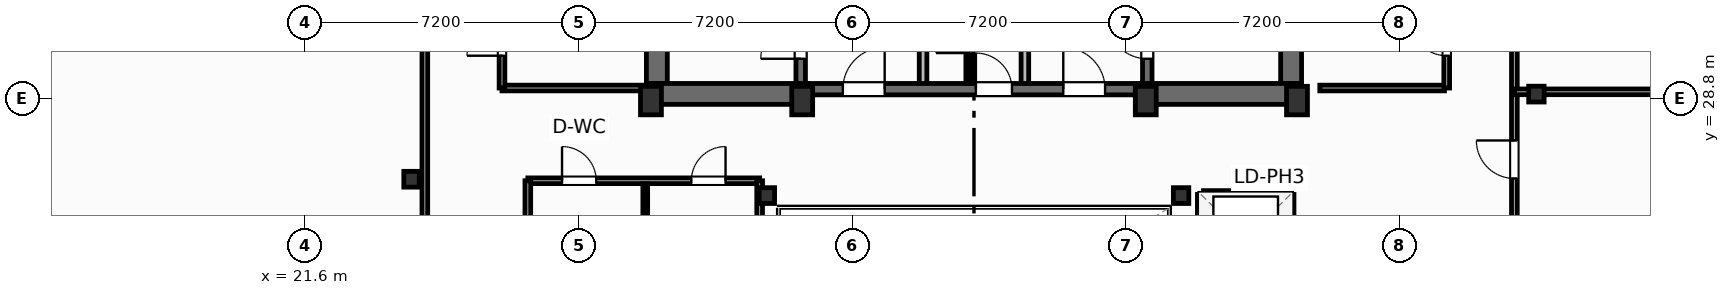
"""IFC4 building model, lengths in metres.
Left out: names, types, materials, properties, quantities, classifications, styles, units other than length and angle.
Written with IfcOpenShell. Run it as: python <this file> out.ifc"""

import sys

from ifc_helpers import new_model, si_unit, direction, frame, frame_2d, origin, origin_2d, place, context, subcontext, project, spatial, rectangle, i_section, extrude, element, fill, save


model = new_model("IFC4")
c1 = context("Model", 3, precision=1e-05, world=origin(), true_north=direction((0.0, 1.0)))
c2 = subcontext(c1, "Body", "Model", "MODEL_VIEW")
j1 = project(units=[si_unit("LENGTHUNIT", "METRE"), si_unit("PLANEANGLEUNIT", "RADIAN")], contexts=[c1])
p1 = place(None, origin())
s1 = spatial("IfcSite", under=j1, at=p1, CompositionType="ELEMENT")
p2 = place(p1, origin())
s2 = spatial("IfcBuilding", under=s1, at=p2, CompositionType="ELEMENT")
p3 = place(p2, frame((0.0, 0.0, 284.1)))
s3 = spatial("IfcBuildingStorey", under=s2, at=p3, CompositionType="ELEMENT", Elevation=284.1)
for number, where, z_axis, x_axis in (
    (1, (30.7, 28.75, 0.0), (0.0, 0.0, 1.0), (1.0, 0.0, 0.0)),
    (2, (34.68, 28.75, 0.0), (0.0, 0.0, 1.0), (1.0, 0.0, 0.0)),
    (3, (43.72, 28.75, 0.0), (0.0, 0.0, 1.0), (1.0, 0.0, 0.0)),
    (4, (47.7, 28.75, 0.0), (0.0, 0.0, 1.0), (1.0, 0.0, 0.0)),
):
    element("IfcColumn", number, at=place(p3, frame(where, z_axis=z_axis, x_axis=x_axis)), inside=s3, PredefinedType="COLUMN", context=c2, shape_type="SweptSolid", body=[
        extrude(rectangle(XDim=0.55, YDim=0.75, at=origin_2d()), origin(), (0.0, 0.0, 1.0), 3.7),
    ])
for number, where, z_axis, x_axis in (
    (5, (33.75, 26.25, 0.0), (0.0, 0.0, 1.0), (1.0, 0.0, 0.0)),
    (6, (44.65, 26.25, 0.0), (0.0, 0.0, 1.0), (1.0, 0.0, 0.0)),
    (7, (24.4, 26.68, 0.0), (0.0, 0.0, 1.0), (1.0, 0.0, 0.0)),
    (8, (54.0, 28.92, 0.0), (0.0, 0.0, 1.0), (1.0, 0.0, 0.0)),
):
    element("IfcColumn", number, at=place(p3, frame(where, z_axis=z_axis, x_axis=x_axis)), inside=s3, PredefinedType="COLUMN", context=c2, shape_type="SweptSolid", body=[
        extrude(i_section(OverallWidth=0.406, OverallDepth=0.416, WebThickness=0.03, FlangeThickness=0.048, FilletRadius=0.025, at=origin_2d()), origin(), (0.0, 0.0, 1.0), 3.7),
    ])
for number, where, z_axis, x_axis in (
    (9, (30.855, 29.2, 0.0), (0.0, 0.0, 1.0), (0.0, 1.0, 0.0)),
    (10, (47.545, 29.2, 0.0), (0.0, 0.0, 1.0), (0.0, 1.0, 0.0)),
):
    element("IfcWall", number, at=place(p3, frame(where, z_axis=z_axis, x_axis=x_axis)), inside=s3, PredefinedType="SHEAR", context=c2, shape_type="SweptSolid", body=[
        extrude(rectangle(XDim=9.22, YDim=0.55, at=frame_2d((4.61, 0.0))), origin(), (0.0, 0.0, 1.0), 3.45),
    ])
for number, where, z_axis, x_axis in (
    (11, (30.58, 28.925, 0.0), (0.0, 0.0, 1.0), (1.0, 0.0, 0.0)),
    (12, (43.6, 28.925, 0.0), (0.0, 0.0, 1.0), (1.0, 0.0, 0.0)),
):
    element("IfcWall", number, at=place(p3, frame(where, z_axis=z_axis, x_axis=x_axis)), inside=s3, PredefinedType="SHEAR", context=c2, shape_type="SweptSolid", body=[
        extrude(rectangle(XDim=4.22, YDim=0.55, at=frame_2d((2.11, 0.0))), origin(), (0.0, 0.0, 1.0), 3.45),
    ])
p4 = place(p3, frame((34.8, 29.05, 0.0), z_axis=(0.0, 0.0, 1.0), x_axis=(1.0, 0.0, 0.0)))
e13 = element("IfcWall", 13, at=p4, inside=s3, PredefinedType="SHEAR", context=c2, shape_type="SweptSolid", body=[
    extrude(rectangle(XDim=8.8, YDim=0.3, at=frame_2d((4.4, 0.0))), origin(), (0.0, 0.0, 1.0), 3.45),
])
p5 = place(p4, frame((0.95, 0.0, 0.0)))
e14 = element("IfcOpeningElement", 14, at=p5, cuts=e13, PredefinedType="OPENING", context=c2, shape_type="SweptSolid", body=[
    extrude(rectangle(XDim=1.1, YDim=2.15, at=frame_2d((0.55, 1.075))), frame((0.0, 0.16, 0.0), z_axis=(0.0, -1.0, 0.0), x_axis=(1.0, 0.0, 0.0)), (0.0, 0.0, 1.0), 0.32),
])
p6 = place(p4, frame((6.75, 0.0, 0.0)))
e15 = element("IfcOpeningElement", 15, at=p6, cuts=e13, PredefinedType="OPENING", context=c2, shape_type="SweptSolid", body=[
    extrude(rectangle(XDim=1.1, YDim=2.15, at=frame_2d((0.55, 1.075))), frame((0.0, 0.16, 0.0), z_axis=(0.0, -1.0, 0.0), x_axis=(1.0, 0.0, 0.0)), (0.0, 0.0, 1.0), 0.32),
])
p7 = place(p4, frame((4.45, 0.0, 0.0)))
e16 = element("IfcOpeningElement", 16, at=p7, cuts=e13, PredefinedType="OPENING", context=c2, shape_type="SweptSolid", body=[
    extrude(rectangle(XDim=0.95, YDim=2.15, at=frame_2d((0.475, 1.075))), frame((0.0, 0.16, 0.0), z_axis=(0.0, -1.0, 0.0), x_axis=(1.0, 0.0, 0.0)), (0.0, 0.0, 1.0), 0.32),
])
p8 = place(p3, frame((34.64, 29.2, 0.0), z_axis=(0.0, 0.0, 1.0), x_axis=(0.0, 1.0, 0.0)))
e17 = element("IfcWall", 17, at=p8, inside=s3, PredefinedType="SHEAR", context=c2, shape_type="SweptSolid", body=[
    extrude(rectangle(XDim=9.22, YDim=0.25, at=frame_2d((4.61, 0.0))), origin(), (0.0, 0.0, 1.0), 3.45),
])
p9 = place(p8, frame((0.65, 0.0, 0.0)))
e18 = element("IfcOpeningElement", 18, at=p9, cuts=e17, PredefinedType="OPENING", context=c2, shape_type="SweptSolid", body=[
    extrude(rectangle(XDim=1.05, YDim=2.15, at=frame_2d((0.525, 1.075))), frame((0.0, 0.135, 0.0), z_axis=(0.0, -1.0, 0.0), x_axis=(1.0, 0.0, 0.0)), (0.0, 0.0, 1.0), 0.27),
])
p10 = place(p3, frame((43.76, 29.2, 0.0), z_axis=(0.0, 0.0, 1.0), x_axis=(0.0, 1.0, 0.0)))
e19 = element("IfcWall", 19, at=p10, inside=s3, PredefinedType="SHEAR", context=c2, shape_type="SweptSolid", body=[
    extrude(rectangle(XDim=9.22, YDim=0.25, at=frame_2d((4.61, 0.0))), origin(), (0.0, 0.0, 1.0), 3.45),
])
p11 = place(p10, frame((0.65, 0.0, 0.0)))
e20 = element("IfcOpeningElement", 20, at=p11, cuts=e19, PredefinedType="OPENING", context=c2, shape_type="SweptSolid", body=[
    extrude(rectangle(XDim=1.05, YDim=2.15, at=frame_2d((0.525, 1.075))), frame((0.0, 0.135, 0.0), z_axis=(0.0, -1.0, 0.0), x_axis=(1.0, 0.0, 0.0)), (0.0, 0.0, 1.0), 0.27),
])
p12 = place(p3, frame((27.46, 26.64, 0.0), z_axis=(0.0, 0.0, 1.0), x_axis=(1.0, 0.0, 0.0)))
e21 = element("IfcWall", 21, at=p12, inside=s3, PredefinedType="PARTITIONING", context=c2, shape_type="SweptSolid", body=[
    extrude(rectangle(XDim=6.1, YDim=0.15, at=frame_2d((3.05, 0.0))), origin(), (0.0, 0.0, 1.0), 2.662),
])
p13 = place(p12, frame((0.9, 0.0, 0.0)))
e22 = element("IfcOpeningElement", 22, at=p13, cuts=e21, PredefinedType="OPENING", context=c2, shape_type="SweptSolid", body=[
    extrude(rectangle(XDim=0.9, YDim=2.05, at=frame_2d((0.45, 1.025))), frame((0.0, 0.085, 0.0), z_axis=(0.0, -1.0, 0.0), x_axis=(1.0, 0.0, 0.0)), (0.0, 0.0, 1.0), 0.17),
])
p14 = place(p12, frame((4.303, 0.0, 0.0)))
e23 = element("IfcOpeningElement", 23, at=p14, cuts=e21, PredefinedType="OPENING", context=c2, shape_type="SweptSolid", body=[
    extrude(rectangle(XDim=0.9, YDim=2.05, at=frame_2d((0.45, 1.025))), frame((0.0, 0.085, 0.0), z_axis=(0.0, -1.0, 0.0), x_axis=(1.0, 0.0, 0.0)), (0.0, 0.0, 1.0), 0.17),
])
p15 = place(p3, frame((30.55, 19.38, 0.0), z_axis=(0.0, 0.0, 1.0), x_axis=(0.0, 1.0, 0.0)))
e24 = element("IfcWall", 24, at=p15, inside=s3, PredefinedType="PARTITIONING", context=c2, shape_type="SweptSolid", body=[
    extrude(rectangle(XDim=7.18, YDim=0.125, at=frame_2d((3.59, 0.0))), origin(), (0.0, 0.0, 1.0), 3.45),
])
p16 = place(p3, frame((27.46, 19.3, 0.0), z_axis=(0.0, 0.0, 1.0), x_axis=(0.0, 1.0, 0.0)))
e25 = element("IfcWall", 25, at=p16, inside=s3, PredefinedType="PARTITIONING", context=c2, shape_type="SweptSolid", body=[
    extrude(rectangle(XDim=7.34, YDim=0.15, at=frame_2d((3.67, 0.0))), origin(), (0.0, 0.0, 1.0), 3.45),
])
p17 = place(p3, frame((33.56, 19.3, 0.0), z_axis=(0.0, 0.0, 1.0), x_axis=(0.0, 1.0, 0.0)))
e26 = element("IfcWall", 26, at=p17, inside=s3, PredefinedType="PARTITIONING", context=c2, shape_type="SweptSolid", body=[
    extrude(rectangle(XDim=7.34, YDim=0.15, at=frame_2d((3.67, 0.0))), origin(), (0.0, 0.0, 1.0), 2.824),
])
p18 = place(p3, frame((24.75, 16.85, 0.0), z_axis=(0.0, 0.0, 1.0), x_axis=(0.0, 1.0, 0.0)))
e27 = element("IfcWall", 27, at=p18, inside=s3, PredefinedType="PARTITIONING", context=c2, shape_type="SweptSolid", body=[
    extrude(rectangle(XDim=23.325, YDim=0.15, at=frame_2d((11.663, 0.0))), origin(), (0.0, 0.0, 1.0), 3.45),
])
p19 = place(p18, frame((6.0, 0.0, 0.0)))
e28 = element("IfcOpeningElement", 28, at=p19, cuts=e27, PredefinedType="OPENING", context=c2, shape_type="SweptSolid", body=[
    extrude(rectangle(XDim=1.0, YDim=2.05, at=frame_2d((0.5, 1.025))), frame((0.0, 0.085, 0.0), z_axis=(0.0, -1.0, 0.0), x_axis=(1.0, 0.0, 0.0)), (0.0, 0.0, 1.0), 0.17),
])
p20 = place(p3, frame((53.42, 19.3, 0.0), z_axis=(0.0, 0.0, 1.0), x_axis=(0.0, 1.0, 0.0)))
e29 = element("IfcWall", 29, at=p20, inside=s3, PredefinedType="PARTITIONING", context=c2, shape_type="SweptSolid", body=[
    extrude(rectangle(XDim=20.02, YDim=0.15, at=frame_2d((10.01, 0.0))), origin(), (0.0, 0.0, 1.0), 3.45),
])
p21 = place(p20, frame((7.4, 0.0, 0.0)))
e30 = element("IfcOpeningElement", 30, at=p21, cuts=e29, PredefinedType="OPENING", context=c2, shape_type="SweptSolid", body=[
    extrude(rectangle(XDim=1.0, YDim=2.05, at=frame_2d((0.5, 1.025))), frame((0.0, 0.085, 0.0), z_axis=(0.0, -1.0, 0.0), x_axis=(1.0, 0.0, 0.0)), (0.0, 0.0, 1.0), 0.17),
])
p22 = place(p20, frame((12.5, 0.0, 0.0)))
e31 = element("IfcOpeningElement", 31, at=p22, cuts=e29, PredefinedType="OPENING", context=c2, shape_type="SweptSolid", body=[
    extrude(rectangle(XDim=1.0, YDim=2.05, at=frame_2d((0.5, 1.025))), frame((0.0, 0.085, 0.0), z_axis=(0.0, -1.0, 0.0), x_axis=(1.0, 0.0, 0.0)), (0.0, 0.0, 1.0), 0.17),
])
p23 = place(p3, frame((53.42, 28.98, 0.0), z_axis=(0.0, 0.0, 1.0), x_axis=(1.0, 0.0, 0.0)))
e32 = element("IfcWall", 32, at=p23, inside=s3, PredefinedType="PARTITIONING", context=c2, shape_type="SweptSolid", body=[
    extrude(rectangle(XDim=16.58, YDim=0.15, at=frame_2d((8.29, 0.0))), origin(), (0.0, 0.0, 1.0), 2.662),
])
for number, where, z_axis, x_axis in (
    (33, (37.86, 29.2, 0.0), (0.0, 0.0, 1.0), (0.0, 1.0, 0.0)),
    (34, (40.54, 29.2, 0.0), (0.0, 0.0, 1.0), (0.0, 1.0, 0.0)),
):
    element("IfcWall", number, at=place(p3, frame(where, z_axis=z_axis, x_axis=x_axis)), inside=s3, PredefinedType="PARTITIONING", context=c2, shape_type="SweptSolid", body=[
        extrude(rectangle(XDim=5.18, YDim=0.2, at=frame_2d((2.59, 0.0))), origin(), (0.0, 0.0, 1.0), 3.45),
    ])
p24 = place(p3, frame((39.05, 29.2, 0.0), z_axis=(0.0, 0.0, 1.0), x_axis=(0.0, 1.0, 0.0)))
e35 = element("IfcWall", 35, at=p24, inside=s3, PredefinedType="PARTITIONING", context=c2, shape_type="SweptSolid", body=[
    extrude(rectangle(XDim=5.22, YDim=0.125, at=frame_2d((2.61, 0.0))), origin(), (0.0, 0.0, 1.0), 3.45),
])
p25 = place(p24, frame((0.8, 0.0, 0.0)))
e36 = element("IfcOpeningElement", 36, at=p25, cuts=e35, PredefinedType="OPENING", context=c2, shape_type="SweptSolid", body=[
    extrude(rectangle(XDim=0.85, YDim=2.05, at=frame_2d((0.425, 1.025))), frame((0.0, 0.073, 0.0), z_axis=(0.0, -1.0, 0.0), x_axis=(1.0, 0.0, 0.0)), (0.0, 0.0, 1.0), 0.145),
])
p26 = place(p24, frame((3.4, 0.0, 0.0)))
e37 = element("IfcOpeningElement", 37, at=p26, cuts=e35, PredefinedType="OPENING", context=c2, shape_type="SweptSolid", body=[
    extrude(rectangle(XDim=0.85, YDim=2.05, at=frame_2d((0.425, 1.025))), frame((0.0, 0.073, 0.0), z_axis=(0.0, -1.0, 0.0), x_axis=(1.0, 0.0, 0.0)), (0.0, 0.0, 1.0), 0.145),
])
p27 = place(p3, frame((26.78, 29.08, 0.0), z_axis=(0.0, 0.0, 1.0), x_axis=(1.0, 0.0, 0.0)))
e38 = element("IfcWall", 38, at=p27, inside=s3, PredefinedType="PARTITIONING", context=c2, shape_type="SweptSolid", body=[
    extrude(rectangle(XDim=3.8, YDim=0.15, at=frame_2d((1.9, 0.0))), origin(), (0.0, 0.0, 1.0), 3.45),
])
p28 = place(p3, frame((26.78, 29.08, 0.0), z_axis=(0.0, 0.0, 1.0), x_axis=(0.0, 1.0, 0.0)))
e39 = element("IfcWall", 39, at=p28, inside=s3, PredefinedType="PARTITIONING", context=c2, shape_type="SweptSolid", body=[
    extrude(rectangle(XDim=5.87, YDim=0.15, at=frame_2d((2.935, 0.0))), origin(), (0.0, 0.0, 1.0), 3.45),
])
p29 = place(p28, frame((0.85, 0.0, 0.0)))
e40 = element("IfcOpeningElement", 40, at=p29, cuts=e39, PredefinedType="OPENING", context=c2, shape_type="SweptSolid", body=[
    extrude(rectangle(XDim=0.92, YDim=2.05, at=frame_2d((0.46, 1.025))), frame((0.0, 0.085, 0.0), z_axis=(0.0, -1.0, 0.0), x_axis=(1.0, 0.0, 0.0)), (0.0, 0.0, 1.0), 0.17),
])
p30 = place(p28, frame((3.45, 0.0, 0.0)))
e41 = element("IfcOpeningElement", 41, at=p30, cuts=e39, PredefinedType="OPENING", context=c2, shape_type="SweptSolid", body=[
    extrude(rectangle(XDim=0.85, YDim=2.05, at=frame_2d((0.425, 1.025))), frame((0.0, 0.085, 0.0), z_axis=(0.0, -1.0, 0.0), x_axis=(1.0, 0.0, 0.0)), (0.0, 0.0, 1.0), 0.17),
])
p31 = place(p3, frame((48.3, 29.08, 0.0), z_axis=(0.0, 0.0, 1.0), x_axis=(1.0, 0.0, 0.0)))
e42 = element("IfcWall", 42, at=p31, inside=s3, PredefinedType="PARTITIONING", context=c2, shape_type="SweptSolid", body=[
    extrude(rectangle(XDim=3.28, YDim=0.15, at=frame_2d((1.64, 0.0))), origin(), (0.0, 0.0, 1.0), 2.662),
])
p32 = place(p3, frame((51.64, 29.08, 0.0), z_axis=(0.0, 0.0, 1.0), x_axis=(0.0, 1.0, 0.0)))
e43 = element("IfcWall", 43, at=p32, inside=s3, PredefinedType="PARTITIONING", context=c2, shape_type="SweptSolid", body=[
    extrude(rectangle(XDim=6.88, YDim=0.15, at=frame_2d((3.44, 0.0))), origin(), (0.0, 0.0, 1.0), 3.45),
])
p33 = place(p32, frame((0.85, 0.0, 0.0)))
e44 = element("IfcOpeningElement", 44, at=p33, cuts=e43, PredefinedType="OPENING", context=c2, shape_type="SweptSolid", body=[
    extrude(rectangle(XDim=0.95, YDim=2.05, at=frame_2d((0.475, 1.025))), frame((0.0, 0.085, 0.0), z_axis=(0.0, -1.0, 0.0), x_axis=(1.0, 0.0, 0.0)), (0.0, 0.0, 1.0), 0.17),
])
p34 = place(p3, frame((45.24, 26.28, 0.0), z_axis=(0.0, 0.0, 1.0), x_axis=(1.0, 0.0, 0.0)))
e45 = element("IfcWall", 45, at=p34, inside=s3, PredefinedType="PARTITIONING", context=c2, shape_type="SweptSolid", body=[
    extrude(rectangle(XDim=2.22, YDim=0.2, at=frame_2d((1.11, 0.0))), origin(), (0.0, 0.0, 1.0), 3.45),
])
p35 = place(p3, frame((45.18, 19.38, 0.0), z_axis=(0.0, 0.0, 1.0), x_axis=(0.0, 1.0, 0.0)))
e46 = element("IfcWall", 46, at=p35, inside=s3, PredefinedType="PARTITIONING", context=c2, shape_type="SweptSolid", body=[
    extrude(rectangle(XDim=6.9, YDim=0.2, at=frame_2d((3.45, 0.0))), origin(), (0.0, 0.0, 1.0), 3.45),
])
p36 = place(p3, frame((47.52, 19.38, 0.0), z_axis=(0.0, 0.0, 1.0), x_axis=(0.0, 1.0, 0.0)))
e47 = element("IfcWall", 47, at=p36, inside=s3, PredefinedType="PARTITIONING", context=c2, shape_type="SweptSolid", body=[
    extrude(rectangle(XDim=6.9, YDim=0.2, at=frame_2d((3.45, 0.0))), origin(), (0.0, 0.0, 1.0), 3.45),
])
p37 = place(p36, frame((0.59, 0.0, 0.0)))
e48 = element("IfcOpeningElement", 48, at=p37, cuts=e47, PredefinedType="OPENING", context=c2, shape_type="SweptSolid", body=[
    extrude(rectangle(XDim=1.1, YDim=2.15, at=frame_2d((0.55, 1.075))), frame((0.0, 0.11, 0.0), z_axis=(0.0, -1.0, 0.0), x_axis=(1.0, 0.0, 0.0)), (0.0, 0.0, 1.0), 0.22),
])
p38 = place(p36, frame((2.89, 0.0, 0.0)))
e49 = element("IfcOpeningElement", 49, at=p38, cuts=e47, PredefinedType="OPENING", context=c2, shape_type="SweptSolid", body=[
    extrude(rectangle(XDim=1.1, YDim=2.15, at=frame_2d((0.55, 1.075))), frame((0.0, 0.11, 0.0), z_axis=(0.0, -1.0, 0.0), x_axis=(1.0, 0.0, 0.0)), (0.0, 0.0, 1.0), 0.22),
])
p39 = place(p36, frame((5.19, 0.0, 0.0)))
e50 = element("IfcOpeningElement", 50, at=p39, cuts=e47, PredefinedType="OPENING", context=c2, shape_type="SweptSolid", body=[
    extrude(rectangle(XDim=1.1, YDim=2.15, at=frame_2d((0.55, 1.075))), frame((0.0, 0.11, 0.0), z_axis=(0.0, -1.0, 0.0), x_axis=(1.0, 0.0, 0.0)), (0.0, 0.0, 1.0), 0.22),
])
p40 = place(p13, origin())
e51 = element("IfcDoor", 51, at=p40, inside=s3, OperationType="SINGLE_SWING_LEFT", PredefinedType="DOOR", context=c2, shape_type="SweptSolid", body=[
    extrude(rectangle(XDim=0.9, YDim=2.05, at=frame_2d((0.45, 1.025))), frame((0.0, 0.025, 0.0), z_axis=(0.0, -1.0, 0.0), x_axis=(1.0, 0.0, 0.0)), (0.0, 0.0, 1.0), 0.05),
])
fill(e22, e51)
p41 = place(p14, origin())
e52 = element("IfcDoor", 52, at=p41, inside=s3, OperationType="SINGLE_SWING_RIGHT", PredefinedType="DOOR", context=c2, shape_type="SweptSolid", body=[
    extrude(rectangle(XDim=0.9, YDim=2.05, at=frame_2d((0.45, 1.025))), frame((0.0, 0.025, 0.0), z_axis=(0.0, -1.0, 0.0), x_axis=(1.0, 0.0, 0.0)), (0.0, 0.0, 1.0), 0.05),
])
fill(e23, e52)
p42 = place(p21, origin())
e53 = element("IfcDoor", 53, at=p42, inside=s3, OperationType="SINGLE_SWING_RIGHT", PredefinedType="DOOR", context=c2, shape_type="SweptSolid", body=[
    extrude(rectangle(XDim=1.0, YDim=2.05, at=frame_2d((0.5, 1.025))), frame((0.0, 0.025, 0.0), z_axis=(0.0, -1.0, 0.0), x_axis=(1.0, 0.0, 0.0)), (0.0, 0.0, 1.0), 0.05),
])
fill(e30, e53)
p43 = place(p9, origin())
e54 = element("IfcDoor", 54, at=p43, inside=s3, OperationType="SINGLE_SWING_LEFT", PredefinedType="DOOR", context=c2, shape_type="SweptSolid", body=[
    extrude(rectangle(XDim=1.05, YDim=2.15, at=frame_2d((0.525, 1.075))), frame((0.0, 0.025, 0.0), z_axis=(0.0, -1.0, 0.0), x_axis=(1.0, 0.0, 0.0)), (0.0, 0.0, 1.0), 0.05),
])
fill(e18, e54)
p44 = place(p11, origin())
e55 = element("IfcDoor", 55, at=p44, inside=s3, OperationType="SINGLE_SWING_RIGHT", PredefinedType="DOOR", context=c2, shape_type="SweptSolid", body=[
    extrude(rectangle(XDim=1.05, YDim=2.15, at=frame_2d((0.525, 1.075))), frame((0.0, 0.025, 0.0), z_axis=(0.0, -1.0, 0.0), x_axis=(1.0, 0.0, 0.0)), (0.0, 0.0, 1.0), 0.05),
])
fill(e20, e55)
p45 = place(p5, origin())
e56 = element("IfcDoor", 56, at=p45, inside=s3, OperationType="SINGLE_SWING_RIGHT", PredefinedType="DOOR", context=c2, shape_type="SweptSolid", body=[
    extrude(rectangle(XDim=1.1, YDim=2.15, at=frame_2d((0.55, 1.075))), frame((0.0, 0.025, 0.0), z_axis=(0.0, -1.0, 0.0), x_axis=(1.0, 0.0, 0.0)), (0.0, 0.0, 1.0), 0.05),
])
fill(e14, e56)
p46 = place(p6, origin())
e57 = element("IfcDoor", 57, at=p46, inside=s3, OperationType="SINGLE_SWING_LEFT", PredefinedType="DOOR", context=c2, shape_type="SweptSolid", body=[
    extrude(rectangle(XDim=1.1, YDim=2.15, at=frame_2d((0.55, 1.075))), frame((0.0, 0.025, 0.0), z_axis=(0.0, -1.0, 0.0), x_axis=(1.0, 0.0, 0.0)), (0.0, 0.0, 1.0), 0.05),
])
fill(e15, e57)
p47 = place(p25, origin())
e58 = element("IfcDoor", 58, at=p47, inside=s3, OperationType="SINGLE_SWING_LEFT", PredefinedType="DOOR", context=c2, shape_type="SweptSolid", body=[
    extrude(rectangle(XDim=0.85, YDim=2.05, at=frame_2d((0.425, 1.025))), frame((0.0, 0.025, 0.0), z_axis=(0.0, -1.0, 0.0), x_axis=(1.0, 0.0, 0.0)), (0.0, 0.0, 1.0), 0.05),
])
fill(e36, e58)
p48 = place(p7, origin())
e59 = element("IfcDoor", 59, at=p48, inside=s3, OperationType="SINGLE_SWING_LEFT", PredefinedType="DOOR", context=c2, shape_type="SweptSolid", body=[
    extrude(rectangle(XDim=0.95, YDim=2.15, at=frame_2d((0.475, 1.075))), frame((0.0, 0.025, 0.0), z_axis=(0.0, -1.0, 0.0), x_axis=(1.0, 0.0, 0.0)), (0.0, 0.0, 1.0), 0.05),
])
fill(e16, e59)
p49 = place(p29, origin())
e60 = element("IfcDoor", 60, at=p49, inside=s3, OperationType="SINGLE_SWING_LEFT", PredefinedType="DOOR", context=c2, shape_type="SweptSolid", body=[
    extrude(rectangle(XDim=0.92, YDim=2.05, at=frame_2d((0.46, 1.025))), frame((0.0, 0.025, 0.0), z_axis=(0.0, -1.0, 0.0), x_axis=(1.0, 0.0, 0.0)), (0.0, 0.0, 1.0), 0.05),
])
fill(e40, e60)
p50 = place(p33, origin())
e61 = element("IfcDoor", 61, at=p50, inside=s3, OperationType="SINGLE_SWING_RIGHT", PredefinedType="DOOR", context=c2, shape_type="SweptSolid", body=[
    extrude(rectangle(XDim=0.95, YDim=2.05, at=frame_2d((0.475, 1.025))), frame((0.0, 0.025, 0.0), z_axis=(0.0, -1.0, 0.0), x_axis=(1.0, 0.0, 0.0)), (0.0, 0.0, 1.0), 0.05),
])
fill(e44, e61)
save(model, sys.argv[1])
